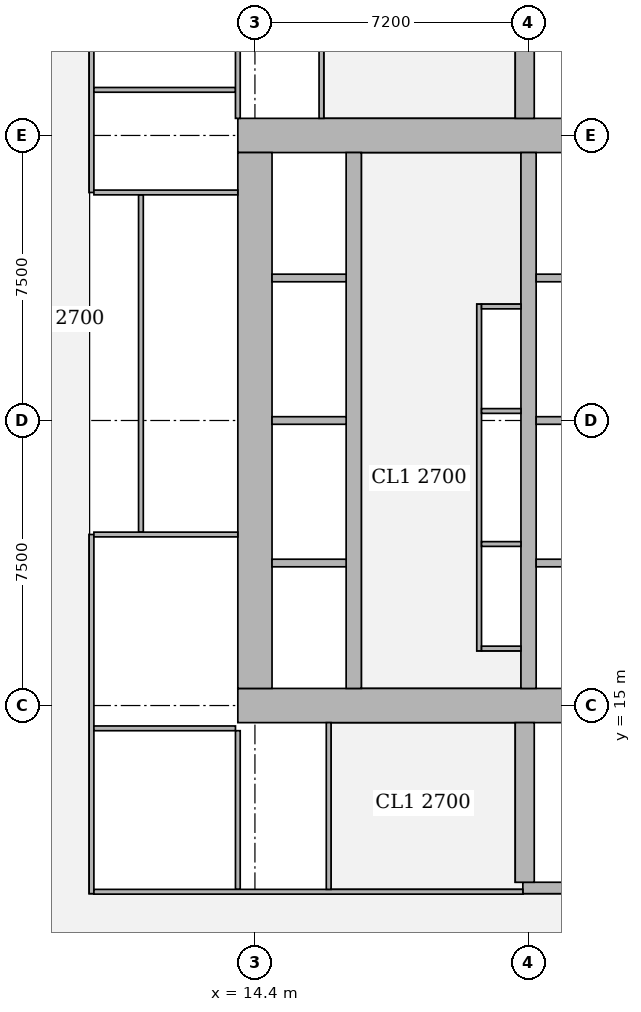
"""IFC4 building model, lengths in metres.
Left out: names, types, materials, properties, quantities, classifications, styles, units other than length and angle.
Written with IfcOpenShell. Run it as: python <this file> out.ifc"""

import sys

from ifc_helpers import new_model, si_unit, direction, frame, frame_2d, origin, place, context, subcontext, project, spatial, rectangle, extrude, element, fill, save


model = new_model("IFC4")
c1 = context("Model", 3, precision=1e-05, world=origin(), true_north=direction((0.0, 1.0)))
c2 = subcontext(c1, "Body", "Model", "MODEL_VIEW")
j1 = project(units=[si_unit("LENGTHUNIT", "METRE"), si_unit("PLANEANGLEUNIT", "RADIAN")], contexts=[c1])
p1 = place(None, origin())
s1 = spatial("IfcSite", under=j1, at=p1, CompositionType="ELEMENT")
p2 = place(p1, origin())
s2 = spatial("IfcBuilding", under=s1, at=p2, CompositionType="ELEMENT")
p3 = place(p2, frame((0.0, 0.0, 100.4)))
s3 = spatial("IfcBuildingStorey", under=s2, at=p3, CompositionType="ELEMENT", Elevation=100.4)
p4 = place(p3, frame((13.95, 15.0, 0.0), z_axis=(0.0, 0.0, 1.0), x_axis=(1.0, 0.0, 0.0)))
e1 = element("IfcWall", 1, at=p4, inside=s3, PredefinedType="SHEAR", context=c2, shape_type="SweptSolid", body=[
    extrude(rectangle(XDim=15.3, YDim=0.9, at=frame_2d((7.65, 0.0))), origin(), (0.0, 0.0, 1.0), 3.75),
])
p5 = place(p4, frame((4.45, 0.0, 0.0)))
e2 = element("IfcOpeningElement", 2, at=p5, cuts=e1, PredefinedType="OPENING", context=c2, shape_type="SweptSolid", body=[
    extrude(rectangle(XDim=1.8, YDim=2.1, at=frame_2d((0.9, 1.05))), frame((0.0, 0.46, 0.0), z_axis=(0.0, -1.0, 0.0), x_axis=(1.0, 0.0, 0.0)), (0.0, 0.0, 1.0), 0.92),
])
p6 = place(p4, frame((10.7, 0.0, 0.0)))
e3 = element("IfcOpeningElement", 3, at=p6, cuts=e1, PredefinedType="OPENING", context=c2, shape_type="SweptSolid", body=[
    extrude(rectangle(XDim=1.1, YDim=2.1, at=frame_2d((0.55, 1.05))), frame((0.0, 0.46, 0.0), z_axis=(0.0, -1.0, 0.0), x_axis=(1.0, 0.0, 0.0)), (0.0, 0.0, 1.0), 0.92),
])
p7 = place(p3, frame((13.95, 30.0, 0.0), z_axis=(0.0, 0.0, 1.0), x_axis=(1.0, 0.0, 0.0)))
e4 = element("IfcWall", 4, at=p7, inside=s3, PredefinedType="SHEAR", context=c2, shape_type="SweptSolid", body=[
    extrude(rectangle(XDim=15.3, YDim=0.9, at=frame_2d((7.65, 0.0))), origin(), (0.0, 0.0, 1.0), 3.75),
])
p8 = place(p7, frame((4.45, 0.0, 0.0)))
e5 = element("IfcOpeningElement", 5, at=p8, cuts=e4, PredefinedType="OPENING", context=c2, shape_type="SweptSolid", body=[
    extrude(rectangle(XDim=1.8, YDim=2.1, at=frame_2d((0.9, 1.05))), frame((0.0, 0.46, 0.0), z_axis=(0.0, -1.0, 0.0), x_axis=(1.0, 0.0, 0.0)), (0.0, 0.0, 1.0), 0.92),
])
p9 = place(p7, frame((10.7, 0.0, 0.0)))
e6 = element("IfcOpeningElement", 6, at=p9, cuts=e4, PredefinedType="OPENING", context=c2, shape_type="SweptSolid", body=[
    extrude(rectangle(XDim=1.1, YDim=2.1, at=frame_2d((0.55, 1.05))), frame((0.0, 0.46, 0.0), z_axis=(0.0, -1.0, 0.0), x_axis=(1.0, 0.0, 0.0)), (0.0, 0.0, 1.0), 0.92),
])
p10 = place(p3, frame((14.4, 15.45, 0.0), z_axis=(0.0, 0.0, 1.0), x_axis=(0.0, 1.0, 0.0)))
e7 = element("IfcWall", 7, at=p10, inside=s3, PredefinedType="SHEAR", context=c2, shape_type="SweptSolid", body=[
    extrude(rectangle(XDim=14.1, YDim=0.9, at=frame_2d((7.05, 0.0))), origin(), (0.0, 0.0, 1.0), 3.75),
])
p11 = place(p3, frame((17.0, 15.45, 0.0), z_axis=(0.0, 0.0, 1.0), x_axis=(0.0, 1.0, 0.0)))
e8 = element("IfcWall", 8, at=p11, inside=s3, PredefinedType="SHEAR", context=c2, shape_type="SweptSolid", body=[
    extrude(rectangle(XDim=14.1, YDim=0.4, at=frame_2d((7.05, 0.0))), origin(), (0.0, 0.0, 1.0), 3.75),
])
p12 = place(p11, frame((0.875, 0.0, 0.0)))
e9 = element("IfcOpeningElement", 9, at=p12, cuts=e8, PredefinedType="OPENING", context=c2, shape_type="SweptSolid", body=[
    extrude(rectangle(XDim=1.1, YDim=2.1, at=frame_2d((0.55, 1.05))), frame((0.0, 0.21, 0.0), z_axis=(0.0, -1.0, 0.0), x_axis=(1.0, 0.0, 0.0)), (0.0, 0.0, 1.0), 0.42),
])
p13 = place(p11, frame((4.625, 0.0, 0.0)))
e10 = element("IfcOpeningElement", 10, at=p13, cuts=e8, PredefinedType="OPENING", context=c2, shape_type="SweptSolid", body=[
    extrude(rectangle(XDim=1.1, YDim=2.1, at=frame_2d((0.55, 1.05))), frame((0.0, 0.21, 0.0), z_axis=(0.0, -1.0, 0.0), x_axis=(1.0, 0.0, 0.0)), (0.0, 0.0, 1.0), 0.42),
])
p14 = place(p11, frame((8.375, 0.0, 0.0)))
e11 = element("IfcOpeningElement", 11, at=p14, cuts=e8, PredefinedType="OPENING", context=c2, shape_type="SweptSolid", body=[
    extrude(rectangle(XDim=1.1, YDim=2.1, at=frame_2d((0.55, 1.05))), frame((0.0, 0.21, 0.0), z_axis=(0.0, -1.0, 0.0), x_axis=(1.0, 0.0, 0.0)), (0.0, 0.0, 1.0), 0.42),
])
p15 = place(p11, frame((12.125, 0.0, 0.0)))
e12 = element("IfcOpeningElement", 12, at=p15, cuts=e8, PredefinedType="OPENING", context=c2, shape_type="SweptSolid", body=[
    extrude(rectangle(XDim=1.1, YDim=2.1, at=frame_2d((0.55, 1.05))), frame((0.0, 0.21, 0.0), z_axis=(0.0, -1.0, 0.0), x_axis=(1.0, 0.0, 0.0)), (0.0, 0.0, 1.0), 0.42),
])
p16 = place(p3, frame((21.6, 15.45, 0.0), z_axis=(0.0, 0.0, 1.0), x_axis=(0.0, 1.0, 0.0)))
e13 = element("IfcWall", 13, at=p16, inside=s3, PredefinedType="SHEAR", context=c2, shape_type="SweptSolid", body=[
    extrude(rectangle(XDim=14.1, YDim=0.4, at=frame_2d((7.05, 0.0))), origin(), (0.0, 0.0, 1.0), 3.75),
])
p17 = place(p3, frame((21.45, 10.2, 0.0), z_axis=(0.0, 0.0, 1.0), x_axis=(1.0, 0.0, 0.0)))
e14 = element("IfcWall", 14, at=p17, inside=s3, PredefinedType="SHEAR", context=c2, shape_type="SweptSolid", body=[
    extrude(rectangle(XDim=7.5, YDim=0.3, at=frame_2d((3.75, 0.0))), origin(), (0.0, 0.0, 1.0), 3.75),
])
p18 = place(p17, frame((0.5, 0.0, 0.0)))
e15 = element("IfcOpeningElement", 15, at=p18, cuts=e14, PredefinedType="OPENING", context=c2, shape_type="SweptSolid", body=[
    extrude(rectangle(XDim=1.1, YDim=2.1, at=frame_2d((0.55, 1.05))), frame((0.0, 0.16, 0.0), z_axis=(0.0, -1.0, 0.0), x_axis=(1.0, 0.0, 0.0)), (0.0, 0.0, 1.0), 0.32),
])
for number, where, z_axis, x_axis in (
    (16, (21.5, 10.35, 0.0), (0.0, 0.0, 1.0), (0.0, 1.0, 0.0)),
    (17, (21.5, 30.45, 0.0), (0.0, 0.0, 1.0), (0.0, 1.0, 0.0)),
):
    element("IfcWall", number, at=place(p3, frame(where, z_axis=z_axis, x_axis=x_axis)), inside=s3, PredefinedType="SHEAR", context=c2, shape_type="SweptSolid", body=[
        extrude(rectangle(XDim=4.2, YDim=0.5, at=frame_2d((2.1, 0.0))), origin(), (0.0, 0.0, 1.0), 3.75),
    ])
p19 = place(p3, frame((10.1, 10.05, 0.0), z_axis=(0.0, 0.0, 1.0), x_axis=(0.0, 1.0, 0.0)))
e18 = element("IfcWall", 18, at=p19, inside=s3, PredefinedType="PARTITIONING", context=c2, shape_type="SweptSolid", body=[
    extrude(rectangle(XDim=9.45, YDim=0.125, at=frame_2d((4.725, 0.0))), origin(), (0.0, 0.0, 1.0), 3.5),
])
p20 = place(p19, frame((1.675, 0.0, 0.0)))
e19 = element("IfcOpeningElement", 19, at=p20, cuts=e18, PredefinedType="OPENING", context=c2, shape_type="SweptSolid", body=[
    extrude(rectangle(XDim=1.0, YDim=2.1, at=frame_2d((0.5, 1.05))), frame((0.0, 0.073, 0.0), z_axis=(0.0, -1.0, 0.0), x_axis=(1.0, 0.0, 0.0)), (0.0, 0.0, 1.0), 0.145),
])
p21 = place(p19, frame((6.4, 0.0, 0.0)))
e20 = element("IfcOpeningElement", 20, at=p21, cuts=e18, PredefinedType="OPENING", context=c2, shape_type="SweptSolid", body=[
    extrude(rectangle(XDim=1.0, YDim=2.1, at=frame_2d((0.5, 1.05))), frame((0.0, 0.073, 0.0), z_axis=(0.0, -1.0, 0.0), x_axis=(1.0, 0.0, 0.0)), (0.0, 0.0, 1.0), 0.145),
])
p22 = place(p3, frame((10.1, 28.5, 0.0), z_axis=(0.0, 0.0, 1.0), x_axis=(0.0, 1.0, 0.0)))
e21 = element("IfcWall", 21, at=p22, inside=s3, PredefinedType="PARTITIONING", context=c2, shape_type="SweptSolid", body=[
    extrude(rectangle(XDim=6.45, YDim=0.125, at=frame_2d((3.225, 0.0))), origin(), (0.0, 0.0, 1.0), 3.5),
])
p23 = place(p22, frame((0.85, 0.0, 0.0)))
e22 = element("IfcOpeningElement", 22, at=p23, cuts=e21, PredefinedType="OPENING", context=c2, shape_type="SweptSolid", body=[
    extrude(rectangle(XDim=1.0, YDim=2.1, at=frame_2d((0.5, 1.05))), frame((0.0, 0.073, 0.0), z_axis=(0.0, -1.0, 0.0), x_axis=(1.0, 0.0, 0.0)), (0.0, 0.0, 1.0), 0.145),
])
p24 = place(p22, frame((4.075, 0.0, 0.0)))
e23 = element("IfcOpeningElement", 23, at=p24, cuts=e21, PredefinedType="OPENING", context=c2, shape_type="SweptSolid", body=[
    extrude(rectangle(XDim=1.0, YDim=2.1, at=frame_2d((0.5, 1.05))), frame((0.0, 0.073, 0.0), z_axis=(0.0, -1.0, 0.0), x_axis=(1.0, 0.0, 0.0)), (0.0, 0.0, 1.0), 0.145),
])
p25 = place(p3, frame((11.4, 19.562, 0.0), z_axis=(0.0, 0.0, 1.0), x_axis=(0.0, 1.0, 0.0)))
e24 = element("IfcWall", 24, at=p25, inside=s3, PredefinedType="PARTITIONING", context=c2, shape_type="SweptSolid", body=[
    extrude(rectangle(XDim=8.876, YDim=0.125, at=frame_2d((4.438, 0.0))), origin(), (0.0, 0.0, 1.0), 3.5),
])
p26 = place(p25, frame((3.938, 0.0, 0.0)))
e25 = element("IfcOpeningElement", 25, at=p26, cuts=e24, PredefinedType="OPENING", context=c2, shape_type="SweptSolid", body=[
    extrude(rectangle(XDim=1.0, YDim=2.1, at=frame_2d((0.5, 1.05))), frame((0.0, 0.073, 0.0), z_axis=(0.0, -1.0, 0.0), x_axis=(1.0, 0.0, 0.0)), (0.0, 0.0, 1.0), 0.145),
])
p27 = place(p3, frame((10.163, 14.4, 0.0), z_axis=(0.0, 0.0, 1.0), x_axis=(1.0, 0.0, 0.0)))
e26 = element("IfcWall", 26, at=p27, inside=s3, PredefinedType="PARTITIONING", context=c2, shape_type="SweptSolid", body=[
    extrude(rectangle(XDim=3.725, YDim=0.125, at=frame_2d((1.862, 0.0))), origin(), (0.0, 0.0, 1.0), 3.5),
])
for number, where, z_axis, x_axis in (
    (27, (10.163, 19.5, 0.0), (0.0, 0.0, 1.0), (1.0, 0.0, 0.0)),
    (28, (10.163, 28.5, 0.0), (0.0, 0.0, 1.0), (1.0, 0.0, 0.0)),
):
    element("IfcWall", number, at=place(p3, frame(where, z_axis=z_axis, x_axis=x_axis)), inside=s3, PredefinedType="PARTITIONING", context=c2, shape_type="SweptSolid", body=[
        extrude(rectangle(XDim=3.787, YDim=0.125, at=frame_2d((1.894, 0.0))), origin(), (0.0, 0.0, 1.0), 3.5),
    ])
p28 = place(p3, frame((10.163, 31.2, 0.0), z_axis=(0.0, 0.0, 1.0), x_axis=(1.0, 0.0, 0.0)))
e29 = element("IfcWall", 29, at=p28, inside=s3, PredefinedType="PARTITIONING", context=c2, shape_type="SweptSolid", body=[
    extrude(rectangle(XDim=3.725, YDim=0.125, at=frame_2d((1.862, 0.0))), origin(), (0.0, 0.0, 1.0), 3.5),
])
p29 = place(p3, frame((13.95, 10.163, 0.0), z_axis=(0.0, 0.0, 1.0), x_axis=(0.0, 1.0, 0.0)))
e30 = element("IfcWall", 30, at=p29, inside=s3, PredefinedType="PARTITIONING", context=c2, shape_type="SweptSolid", body=[
    extrude(rectangle(XDim=4.175, YDim=0.125, at=frame_2d((2.087, 0.0))), origin(), (0.0, 0.0, 1.0), 3.5),
])
p30 = place(p3, frame((13.95, 30.45, 0.0), z_axis=(0.0, 0.0, 1.0), x_axis=(0.0, 1.0, 0.0)))
e31 = element("IfcWall", 31, at=p30, inside=s3, PredefinedType="PARTITIONING", context=c2, shape_type="SweptSolid", body=[
    extrude(rectangle(XDim=4.387, YDim=0.125, at=frame_2d((2.193, 0.0))), origin(), (0.0, 0.0, 1.0), 3.5),
])
p31 = place(p3, frame((10.163, 10.1, 0.0), z_axis=(0.0, 0.0, 1.0), x_axis=(1.0, 0.0, 0.0)))
e32 = element("IfcWall", 32, at=p31, inside=s3, PredefinedType="PARTITIONING", context=c2, shape_type="SweptSolid", body=[
    extrude(rectangle(XDim=11.287, YDim=0.125, at=frame_2d((5.644, 0.0))), origin(), (0.0, 0.0, 1.0), 3.5),
])
p32 = place(p31, frame((7.832, 0.0, 0.0)))
e33 = element("IfcOpeningElement", 33, at=p32, cuts=e32, PredefinedType="OPENING", context=c2, shape_type="SweptSolid", body=[
    extrude(rectangle(XDim=1.8, YDim=2.1, at=frame_2d((0.9, 1.05))), frame((0.0, 0.073, 0.0), z_axis=(0.0, -1.0, 0.0), x_axis=(1.0, 0.0, 0.0)), (0.0, 0.0, 1.0), 0.145),
])
p33 = place(p3, frame((16.34, 10.163, 0.0), z_axis=(0.0, 0.0, 1.0), x_axis=(0.0, 1.0, 0.0)))
e34 = element("IfcWall", 34, at=p33, inside=s3, PredefinedType="PARTITIONING", context=c2, shape_type="SweptSolid", body=[
    extrude(rectangle(XDim=4.387, YDim=0.125, at=frame_2d((2.193, 0.0))), origin(), (0.0, 0.0, 1.0), 3.5),
])
p34 = place(p33, frame((1.637, 0.0, 0.0)))
e35 = element("IfcOpeningElement", 35, at=p34, cuts=e34, PredefinedType="OPENING", context=c2, shape_type="SweptSolid", body=[
    extrude(rectangle(XDim=1.0, YDim=2.1, at=frame_2d((0.5, 1.05))), frame((0.0, 0.073, 0.0), z_axis=(0.0, -1.0, 0.0), x_axis=(1.0, 0.0, 0.0)), (0.0, 0.0, 1.0), 0.145),
])
p35 = place(p3, frame((16.15, 30.45, 0.0), z_axis=(0.0, 0.0, 1.0), x_axis=(0.0, 1.0, 0.0)))
e36 = element("IfcWall", 36, at=p35, inside=s3, PredefinedType="PARTITIONING", context=c2, shape_type="SweptSolid", body=[
    extrude(rectangle(XDim=4.387, YDim=0.125, at=frame_2d((2.193, 0.0))), origin(), (0.0, 0.0, 1.0), 3.5),
])
p36 = place(p35, frame((1.75, 0.0, 0.0)))
e37 = element("IfcOpeningElement", 37, at=p36, cuts=e36, PredefinedType="OPENING", context=c2, shape_type="SweptSolid", body=[
    extrude(rectangle(XDim=1.0, YDim=2.1, at=frame_2d((0.5, 1.05))), frame((0.0, 0.073, 0.0), z_axis=(0.0, -1.0, 0.0), x_axis=(1.0, 0.0, 0.0)), (0.0, 0.0, 1.0), 0.145),
])
p37 = place(p3, frame((20.3, 16.438, 0.0), z_axis=(0.0, 0.0, 1.0), x_axis=(0.0, 1.0, 0.0)))
e38 = element("IfcWall", 38, at=p37, inside=s3, PredefinedType="PARTITIONING", context=c2, shape_type="SweptSolid", body=[
    extrude(rectangle(XDim=9.124, YDim=0.125, at=frame_2d((4.562, 0.0))), origin(), (0.0, 0.0, 1.0), 3.5),
])
p38 = place(p37, frame((0.937, 0.0, 0.0)))
e39 = element("IfcOpeningElement", 39, at=p38, cuts=e38, PredefinedType="OPENING", context=c2, shape_type="SweptSolid", body=[
    extrude(rectangle(XDim=1.0, YDim=2.1, at=frame_2d((0.5, 1.05))), frame((0.0, 0.073, 0.0), z_axis=(0.0, -1.0, 0.0), x_axis=(1.0, 0.0, 0.0)), (0.0, 0.0, 1.0), 0.145),
])
p39 = place(p37, frame((4.062, 0.0, 0.0)))
e40 = element("IfcOpeningElement", 40, at=p39, cuts=e38, PredefinedType="OPENING", context=c2, shape_type="SweptSolid", body=[
    extrude(rectangle(XDim=1.0, YDim=2.1, at=frame_2d((0.5, 1.05))), frame((0.0, 0.073, 0.0), z_axis=(0.0, -1.0, 0.0), x_axis=(1.0, 0.0, 0.0)), (0.0, 0.0, 1.0), 0.145),
])
p40 = place(p37, frame((7.187, 0.0, 0.0)))
e41 = element("IfcOpeningElement", 41, at=p40, cuts=e38, PredefinedType="OPENING", context=c2, shape_type="SweptSolid", body=[
    extrude(rectangle(XDim=1.0, YDim=2.1, at=frame_2d((0.5, 1.05))), frame((0.0, 0.073, 0.0), z_axis=(0.0, -1.0, 0.0), x_axis=(1.0, 0.0, 0.0)), (0.0, 0.0, 1.0), 0.145),
])
for number, where, z_axis, x_axis in (
    (42, (20.363, 16.5, 0.0), (0.0, 0.0, 1.0), (1.0, 0.0, 0.0)),
    (43, (20.363, 25.5, 0.0), (0.0, 0.0, 1.0), (1.0, 0.0, 0.0)),
    (44, (20.363, 19.25, 0.0), (0.0, 0.0, 1.0), (1.0, 0.0, 0.0)),
    (45, (20.363, 22.75, 0.0), (0.0, 0.0, 1.0), (1.0, 0.0, 0.0)),
):
    element("IfcWall", number, at=place(p3, frame(where, z_axis=z_axis, x_axis=x_axis)), inside=s3, PredefinedType="PARTITIONING", context=c2, shape_type="SweptSolid", body=[
        extrude(rectangle(XDim=1.037, YDim=0.125, at=frame_2d((0.519, 0.0))), origin(), (0.0, 0.0, 1.0), 3.5),
    ])
p41 = place(p3, frame((14.85, 18.75, 0.0), z_axis=(0.0, 0.0, 1.0), x_axis=(1.0, 0.0, 0.0)))
e46 = element("IfcWall", 46, at=p41, inside=s3, PredefinedType="SOLIDWALL", context=c2, shape_type="SweptSolid", body=[
    extrude(rectangle(XDim=1.95, YDim=0.2, at=frame_2d((0.975, 0.0))), origin(), (0.0, 0.0, 1.0), 3.5),
])
p42 = place(p3, frame((21.8, 18.75, 0.0), z_axis=(0.0, 0.0, 1.0), x_axis=(1.0, 0.0, 0.0)))
e47 = element("IfcWall", 47, at=p42, inside=s3, PredefinedType="SOLIDWALL", context=c2, shape_type="SweptSolid", body=[
    extrude(rectangle(XDim=2.2, YDim=0.2, at=frame_2d((1.1, 0.0))), origin(), (0.0, 0.0, 1.0), 3.5),
])
p43 = place(p3, frame((14.85, 22.5, 0.0), z_axis=(0.0, 0.0, 1.0), x_axis=(1.0, 0.0, 0.0)))
e48 = element("IfcWall", 48, at=p43, inside=s3, PredefinedType="SOLIDWALL", context=c2, shape_type="SweptSolid", body=[
    extrude(rectangle(XDim=1.95, YDim=0.2, at=frame_2d((0.975, 0.0))), origin(), (0.0, 0.0, 1.0), 3.5),
])
p44 = place(p3, frame((21.8, 22.5, 0.0), z_axis=(0.0, 0.0, 1.0), x_axis=(1.0, 0.0, 0.0)))
e49 = element("IfcWall", 49, at=p44, inside=s3, PredefinedType="SOLIDWALL", context=c2, shape_type="SweptSolid", body=[
    extrude(rectangle(XDim=2.2, YDim=0.2, at=frame_2d((1.1, 0.0))), origin(), (0.0, 0.0, 1.0), 3.5),
])
p45 = place(p3, frame((14.85, 26.25, 0.0), z_axis=(0.0, 0.0, 1.0), x_axis=(1.0, 0.0, 0.0)))
e50 = element("IfcWall", 50, at=p45, inside=s3, PredefinedType="SOLIDWALL", context=c2, shape_type="SweptSolid", body=[
    extrude(rectangle(XDim=1.95, YDim=0.2, at=frame_2d((0.975, 0.0))), origin(), (0.0, 0.0, 1.0), 3.5),
])
p46 = place(p3, frame((21.8, 26.25, 0.0), z_axis=(0.0, 0.0, 1.0), x_axis=(1.0, 0.0, 0.0)))
e51 = element("IfcWall", 51, at=p46, inside=s3, PredefinedType="SOLIDWALL", context=c2, shape_type="SweptSolid", body=[
    extrude(rectangle(XDim=2.2, YDim=0.2, at=frame_2d((1.1, 0.0))), origin(), (0.0, 0.0, 1.0), 3.5),
])
p47 = place(p20, origin())
e52 = element("IfcDoor", 52, at=p47, inside=s3, OperationType="SINGLE_SWING_RIGHT", PredefinedType="DOOR", context=c2, shape_type="SweptSolid", body=[
    extrude(rectangle(XDim=1.0, YDim=2.1, at=frame_2d((0.5, 1.05))), frame((0.0, 0.025, 0.0), z_axis=(0.0, -1.0, 0.0), x_axis=(1.0, 0.0, 0.0)), (0.0, 0.0, 1.0), 0.05),
])
fill(e19, e52)
p48 = place(p21, origin())
e53 = element("IfcDoor", 53, at=p48, inside=s3, OperationType="SINGLE_SWING_LEFT", PredefinedType="DOOR", context=c2, shape_type="SweptSolid", body=[
    extrude(rectangle(XDim=1.0, YDim=2.1, at=frame_2d((0.5, 1.05))), frame((0.0, 0.025, 0.0), z_axis=(0.0, -1.0, 0.0), x_axis=(1.0, 0.0, 0.0)), (0.0, 0.0, 1.0), 0.05),
])
fill(e20, e53)
p49 = place(p26, origin())
e54 = element("IfcDoor", 54, at=p49, inside=s3, OperationType="SINGLE_SWING_LEFT", PredefinedType="DOOR", context=c2, shape_type="SweptSolid", body=[
    extrude(rectangle(XDim=1.0, YDim=2.1, at=frame_2d((0.5, 1.05))), frame((0.0, 0.025, 0.0), z_axis=(0.0, -1.0, 0.0), x_axis=(1.0, 0.0, 0.0)), (0.0, 0.0, 1.0), 0.05),
])
fill(e25, e54)
p50 = place(p23, origin())
e55 = element("IfcDoor", 55, at=p50, inside=s3, OperationType="SINGLE_SWING_RIGHT", PredefinedType="DOOR", context=c2, shape_type="SweptSolid", body=[
    extrude(rectangle(XDim=1.0, YDim=2.1, at=frame_2d((0.5, 1.05))), frame((0.0, 0.025, 0.0), z_axis=(0.0, -1.0, 0.0), x_axis=(1.0, 0.0, 0.0)), (0.0, 0.0, 1.0), 0.05),
])
fill(e22, e55)
p51 = place(p34, origin())
e56 = element("IfcDoor", 56, at=p51, inside=s3, OperationType="SINGLE_SWING_LEFT", PredefinedType="DOOR", context=c2, shape_type="SweptSolid", body=[
    extrude(rectangle(XDim=1.0, YDim=2.1, at=frame_2d((0.5, 1.05))), frame((0.0, 0.025, 0.0), z_axis=(0.0, -1.0, 0.0), x_axis=(1.0, 0.0, 0.0)), (0.0, 0.0, 1.0), 0.05),
])
fill(e35, e56)
p52 = place(p32, origin())
e57 = element("IfcDoor", 57, at=p52, inside=s3, OperationType="DOUBLE_DOOR_SINGLE_SWING", PredefinedType="DOOR", context=c2, shape_type="SweptSolid", body=[
    extrude(rectangle(XDim=1.8, YDim=2.1, at=frame_2d((0.9, 1.05))), frame((0.0, 0.025, 0.0), z_axis=(0.0, -1.0, 0.0), x_axis=(1.0, 0.0, 0.0)), (0.0, 0.0, 1.0), 0.05),
])
fill(e33, e57)
p53 = place(p38, origin())
e58 = element("IfcDoor", 58, at=p53, inside=s3, OperationType="SINGLE_SWING_RIGHT", PredefinedType="DOOR", context=c2, shape_type="SweptSolid", body=[
    extrude(rectangle(XDim=1.0, YDim=2.1, at=frame_2d((0.5, 1.05))), frame((0.0, 0.025, 0.0), z_axis=(0.0, -1.0, 0.0), x_axis=(1.0, 0.0, 0.0)), (0.0, 0.0, 1.0), 0.05),
])
fill(e39, e58)
p54 = place(p39, origin())
e59 = element("IfcDoor", 59, at=p54, inside=s3, OperationType="SINGLE_SWING_LEFT", PredefinedType="DOOR", context=c2, shape_type="SweptSolid", body=[
    extrude(rectangle(XDim=1.0, YDim=2.1, at=frame_2d((0.5, 1.05))), frame((0.0, 0.025, 0.0), z_axis=(0.0, -1.0, 0.0), x_axis=(1.0, 0.0, 0.0)), (0.0, 0.0, 1.0), 0.05),
])
fill(e40, e59)
p55 = place(p40, origin())
e60 = element("IfcDoor", 60, at=p55, inside=s3, OperationType="SINGLE_SWING_LEFT", PredefinedType="DOOR", context=c2, shape_type="SweptSolid", body=[
    extrude(rectangle(XDim=1.0, YDim=2.1, at=frame_2d((0.5, 1.05))), frame((0.0, 0.025, 0.0), z_axis=(0.0, -1.0, 0.0), x_axis=(1.0, 0.0, 0.0)), (0.0, 0.0, 1.0), 0.05),
])
fill(e41, e60)
p56 = place(p5, origin())
e61 = element("IfcDoor", 61, at=p56, inside=s3, OperationType="DOUBLE_DOOR_SINGLE_SWING", PredefinedType="DOOR", context=c2, shape_type="SweptSolid", body=[
    extrude(rectangle(XDim=1.8, YDim=2.1, at=frame_2d((0.9, 1.05))), frame((0.0, 0.025, 0.0), z_axis=(0.0, -1.0, 0.0), x_axis=(1.0, 0.0, 0.0)), (0.0, 0.0, 1.0), 0.05),
])
fill(e2, e61)
p57 = place(p8, origin())
e62 = element("IfcDoor", 62, at=p57, inside=s3, OperationType="DOUBLE_DOOR_SINGLE_SWING", PredefinedType="DOOR", context=c2, shape_type="SweptSolid", body=[
    extrude(rectangle(XDim=1.8, YDim=2.1, at=frame_2d((0.9, 1.05))), frame((0.0, 0.025, 0.0), z_axis=(0.0, -1.0, 0.0), x_axis=(1.0, 0.0, 0.0)), (0.0, 0.0, 1.0), 0.05),
])
fill(e5, e62)
p58 = place(p12, origin())
e63 = element("IfcDoor", 63, at=p58, inside=s3, OperationType="DOUBLE_DOOR_SLIDING", PredefinedType="DOOR", context=c2, shape_type="SweptSolid", body=[
    extrude(rectangle(XDim=1.1, YDim=2.1, at=frame_2d((0.55, 1.05))), frame((0.0, 0.025, 0.0), z_axis=(0.0, -1.0, 0.0), x_axis=(1.0, 0.0, 0.0)), (0.0, 0.0, 1.0), 0.05),
])
fill(e9, e63)
p59 = place(p13, origin())
e64 = element("IfcDoor", 64, at=p59, inside=s3, OperationType="DOUBLE_DOOR_SLIDING", PredefinedType="DOOR", context=c2, shape_type="SweptSolid", body=[
    extrude(rectangle(XDim=1.1, YDim=2.1, at=frame_2d((0.55, 1.05))), frame((0.0, 0.025, 0.0), z_axis=(0.0, -1.0, 0.0), x_axis=(1.0, 0.0, 0.0)), (0.0, 0.0, 1.0), 0.05),
])
fill(e10, e64)
p60 = place(p14, origin())
e65 = element("IfcDoor", 65, at=p60, inside=s3, OperationType="DOUBLE_DOOR_SLIDING", PredefinedType="DOOR", context=c2, shape_type="SweptSolid", body=[
    extrude(rectangle(XDim=1.1, YDim=2.1, at=frame_2d((0.55, 1.05))), frame((0.0, 0.025, 0.0), z_axis=(0.0, -1.0, 0.0), x_axis=(1.0, 0.0, 0.0)), (0.0, 0.0, 1.0), 0.05),
])
fill(e11, e65)
p61 = place(p15, origin())
e66 = element("IfcDoor", 66, at=p61, inside=s3, OperationType="DOUBLE_DOOR_SLIDING", PredefinedType="DOOR", context=c2, shape_type="SweptSolid", body=[
    extrude(rectangle(XDim=1.1, YDim=2.1, at=frame_2d((0.55, 1.05))), frame((0.0, 0.025, 0.0), z_axis=(0.0, -1.0, 0.0), x_axis=(1.0, 0.0, 0.0)), (0.0, 0.0, 1.0), 0.05),
])
fill(e12, e66)
p62 = place(p18, origin())
e67 = element("IfcDoor", 67, at=p62, inside=s3, OperationType="SINGLE_SWING_LEFT", PredefinedType="DOOR", context=c2, shape_type="SweptSolid", body=[
    extrude(rectangle(XDim=1.1, YDim=2.1, at=frame_2d((0.55, 1.05))), frame((0.0, 0.025, 0.0), z_axis=(0.0, -1.0, 0.0), x_axis=(1.0, 0.0, 0.0)), (0.0, 0.0, 1.0), 0.05),
])
fill(e15, e67)
save(model, sys.argv[1])
